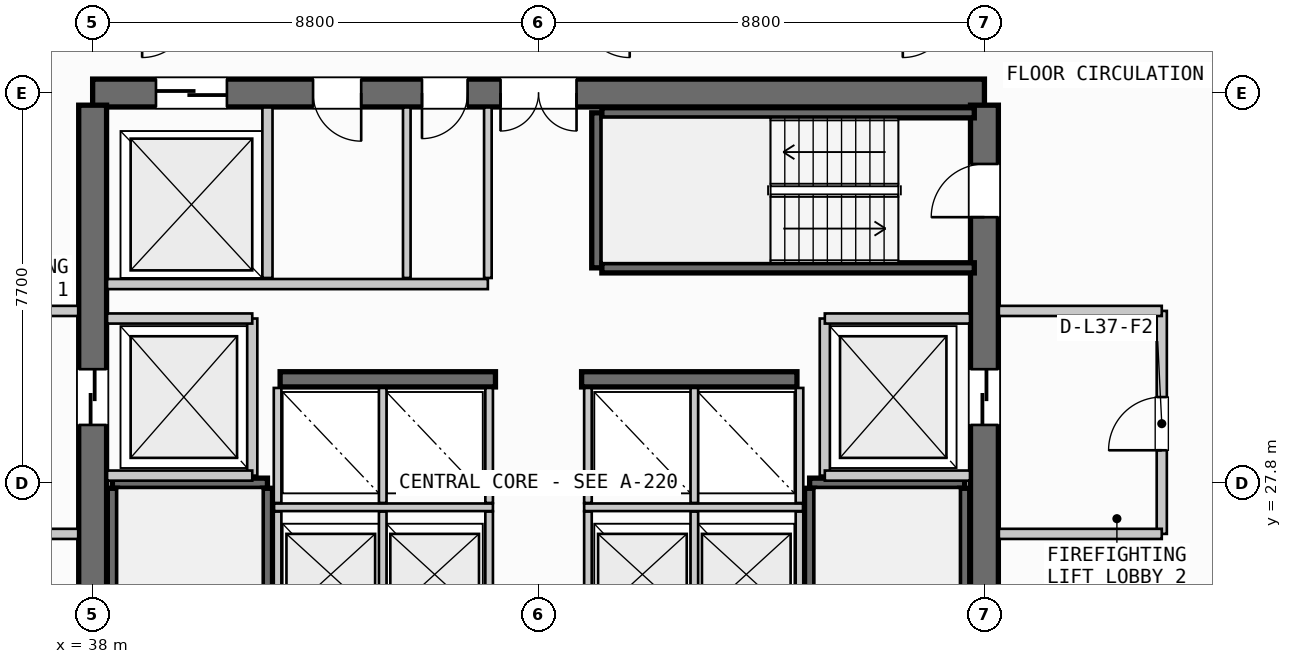
"""IFC4 building model, lengths in metres.
Left out: names, types, materials, properties, quantities, classifications, styles, units other than length and angle.
Written with IfcOpenShell. Run it as: python <this file> out.ifc"""

import sys

from ifc_helpers import new_model, si_unit, direction, frame, frame_2d, origin, place, context, subcontext, project, spatial, rectangle, extrude, source, transform, mapped, element, fill, save


model = new_model("IFC4")
c1 = context("Model", 3, precision=1e-05, world=origin(), true_north=direction((0.0, 1.0)))
c2 = subcontext(c1, "Body", "Model", "MODEL_VIEW")
j1 = project(units=[si_unit("LENGTHUNIT", "METRE"), si_unit("PLANEANGLEUNIT", "RADIAN")], contexts=[c1])
p1 = place(None, origin())
s1 = spatial("IfcSite", under=j1, at=p1, CompositionType="ELEMENT")
p2 = place(p1, origin())
s2 = spatial("IfcBuilding", under=s1, at=p2, CompositionType="ELEMENT")
p3 = place(p2, frame((0.0, 0.0, 146.55)))
s3 = spatial("IfcBuildingStorey", under=s2, at=p3, CompositionType="ELEMENT", Elevation=146.55)
p4 = place(p3, frame((55.6, 35.5, 0.0), z_axis=(0.0, 0.0, 1.0), x_axis=(-1.0, 0.0, 0.0)))
e1 = element("IfcWall", 1, at=p4, inside=s3, PredefinedType="SHEAR", context=c2, shape_type="SweptSolid", body=[
    extrude(rectangle(XDim=17.6, YDim=0.55, at=frame_2d((8.8, 0.0))), origin(), (0.0, 0.0, 1.0), 3.3),
])
p5 = place(p4, frame((8.05, 0.0, 0.0)))
e2 = element("IfcOpeningElement", 2, at=p5, cuts=e1, PredefinedType="OPENING", context=c2, shape_type="SweptSolid", body=[
    extrude(rectangle(XDim=1.5, YDim=2.2, at=frame_2d((0.75, 1.1))), frame((0.0, 0.285, 0.0), z_axis=(0.0, -1.0, 0.0), x_axis=(1.0, 0.0, 0.0)), (0.0, 0.0, 1.0), 0.57),
])
p6 = place(p4, frame((14.95, 0.0, 0.0)))
e3 = element("IfcOpeningElement", 3, at=p6, cuts=e1, PredefinedType="OPENING", context=c2, shape_type="SweptSolid", body=[
    extrude(rectangle(XDim=1.4, YDim=2.3, at=frame_2d((0.7, 1.15))), frame((0.0, 0.285, 0.0), z_axis=(0.0, -1.0, 0.0), x_axis=(1.0, 0.0, 0.0)), (0.0, 0.0, 1.0), 0.57),
])
p7 = place(p4, frame((12.3, 0.0, 0.0)))
e4 = element("IfcOpeningElement", 4, at=p7, cuts=e1, PredefinedType="OPENING", context=c2, shape_type="SweptSolid", body=[
    extrude(rectangle(XDim=0.95, YDim=2.15, at=frame_2d((0.475, 1.075))), frame((0.0, 0.285, 0.0), z_axis=(0.0, -1.0, 0.0), x_axis=(1.0, 0.0, 0.0)), (0.0, 0.0, 1.0), 0.57),
])
p8 = place(p4, frame((10.2, 0.0, 0.0)))
e5 = element("IfcOpeningElement", 5, at=p8, cuts=e1, PredefinedType="OPENING", context=c2, shape_type="SweptSolid", body=[
    extrude(rectangle(XDim=0.9, YDim=2.15, at=frame_2d((0.45, 1.075))), frame((0.0, 0.285, 0.0), z_axis=(0.0, -1.0, 0.0), x_axis=(1.0, 0.0, 0.0)), (0.0, 0.0, 1.0), 0.57),
])
p9 = place(p3, frame((38.0, 35.26, 0.0), z_axis=(0.0, 0.0, 1.0), x_axis=(0.0, -1.0, 0.0)))
e6 = element("IfcWall", 6, at=p9, inside=s3, PredefinedType="SHEAR", context=c2, shape_type="SweptSolid", body=[
    extrude(rectangle(XDim=14.92, YDim=0.55, at=frame_2d((7.46, 0.0))), origin(), (0.0, 0.0, 1.0), 3.3),
])
p10 = place(p9, frame((5.21, 0.0, 0.0)))
e7 = element("IfcOpeningElement", 7, at=p10, cuts=e6, PredefinedType="OPENING", context=c2, shape_type="SweptSolid", body=[
    extrude(rectangle(XDim=1.1, YDim=2.2, at=frame_2d((0.55, 1.1))), frame((0.0, 0.285, 0.0), z_axis=(0.0, -1.0, 0.0), x_axis=(1.0, 0.0, 0.0)), (0.0, 0.0, 1.0), 0.57),
])
p11 = place(p3, frame((55.6, 20.34, 0.0), z_axis=(0.0, 0.0, 1.0), x_axis=(0.0, 1.0, 0.0)))
e8 = element("IfcWall", 8, at=p11, inside=s3, PredefinedType="SHEAR", context=c2, shape_type="SweptSolid", body=[
    extrude(rectangle(XDim=14.92, YDim=0.55, at=frame_2d((7.46, 0.0))), origin(), (0.0, 0.0, 1.0), 3.3),
])
p12 = place(p11, frame((12.71, 0.0, 0.0)))
e9 = element("IfcOpeningElement", 9, at=p12, cuts=e8, PredefinedType="OPENING", context=c2, shape_type="SweptSolid", body=[
    extrude(rectangle(XDim=1.05, YDim=2.15, at=frame_2d((0.525, 1.075))), frame((0.0, 0.285, 0.0), z_axis=(0.0, -1.0, 0.0), x_axis=(1.0, 0.0, 0.0)), (0.0, 0.0, 1.0), 0.57),
])
p13 = place(p11, frame((8.61, 0.0, 0.0)))
e10 = element("IfcOpeningElement", 10, at=p13, cuts=e8, PredefinedType="OPENING", context=c2, shape_type="SweptSolid", body=[
    extrude(rectangle(XDim=1.1, YDim=2.2, at=frame_2d((0.55, 1.1))), frame((0.0, 0.285, 0.0), z_axis=(0.0, -1.0, 0.0), x_axis=(1.0, 0.0, 0.0)), (0.0, 0.0, 1.0), 0.57),
])
for number, where, z_axis, x_axis in (
    (11, (41.7, 29.85, 0.0), (0.0, 0.0, 1.0), (1.0, 0.0, 0.0)),
    (12, (47.65, 29.85, 0.0), (0.0, 0.0, 1.0), (1.0, 0.0, 0.0)),
):
    element("IfcWall", number, at=place(p3, frame(where, z_axis=z_axis, x_axis=x_axis)), inside=s3, PredefinedType="SHEAR", context=c2, shape_type="SweptSolid", body=[
        extrude(rectangle(XDim=4.25, YDim=0.3, at=frame_2d((2.125, 0.0))), origin(), (0.0, 0.0, 1.0), 3.3),
    ])
p14 = place(p3, frame((38.39, 27.8, 0.0), z_axis=(0.0, 0.0, 1.0), x_axis=(1.0, 0.0, 0.0)))
e13 = element("IfcWall", 13, at=p14, inside=s3, PredefinedType="SHEAR", context=c2, shape_type="SweptSolid", body=[
    extrude(rectangle(XDim=3.06, YDim=0.2, at=frame_2d((1.53, 0.0))), origin(), (0.0, 0.0, 1.0), 3.3),
])
for number, where, z_axis, x_axis in (
    (14, (41.45, 27.7, 0.0), (0.0, 0.0, 1.0), (0.0, -1.0, 0.0)),
    (15, (38.39, 20.35, 0.0), (0.0, 0.0, 1.0), (0.0, 1.0, 0.0)),
):
    element("IfcWall", number, at=place(p3, frame(where, z_axis=z_axis, x_axis=x_axis)), inside=s3, PredefinedType="SHEAR", context=c2, shape_type="SweptSolid", body=[
        extrude(rectangle(XDim=7.35, YDim=0.2, at=frame_2d((3.675, 0.0))), origin(), (0.0, 0.0, 1.0), 3.3),
    ])
p15 = place(p3, frame((52.15, 27.8, 0.0), z_axis=(0.0, 0.0, 1.0), x_axis=(1.0, 0.0, 0.0)))
e16 = element("IfcWall", 16, at=p15, inside=s3, PredefinedType="SHEAR", context=c2, shape_type="SweptSolid", body=[
    extrude(rectangle(XDim=3.06, YDim=0.2, at=frame_2d((1.53, 0.0))), origin(), (0.0, 0.0, 1.0), 3.3),
])
for number, where, z_axis, x_axis in (
    (17, (55.21, 27.7, 0.0), (0.0, 0.0, 1.0), (0.0, -1.0, 0.0)),
    (18, (52.15, 20.35, 0.0), (0.0, 0.0, 1.0), (0.0, 1.0, 0.0)),
):
    element("IfcWall", number, at=place(p3, frame(where, z_axis=z_axis, x_axis=x_axis)), inside=s3, PredefinedType="SHEAR", context=c2, shape_type="SweptSolid", body=[
        extrude(rectangle(XDim=7.35, YDim=0.2, at=frame_2d((3.675, 0.0))), origin(), (0.0, 0.0, 1.0), 3.3),
    ])
p16 = place(p3, frame((47.95, 32.05, 0.0), z_axis=(0.0, 0.0, 1.0), x_axis=(0.0, 1.0, 0.0)))
e19 = element("IfcWall", 19, at=p16, inside=s3, PredefinedType="SHEAR", context=c2, shape_type="SweptSolid", body=[
    extrude(rectangle(XDim=3.06, YDim=0.2, at=frame_2d((1.53, 0.0))), origin(), (0.0, 0.0, 1.0), 3.3),
])
for number, where, z_axis, x_axis in (
    (20, (48.05, 35.11, 0.0), (0.0, 0.0, 1.0), (1.0, 0.0, 0.0)),
    (21, (55.4, 32.05, 0.0), (0.0, 0.0, 1.0), (-1.0, 0.0, 0.0)),
):
    element("IfcWall", number, at=place(p3, frame(where, z_axis=z_axis, x_axis=x_axis)), inside=s3, PredefinedType="SHEAR", context=c2, shape_type="SweptSolid", body=[
        extrude(rectangle(XDim=7.35, YDim=0.2, at=frame_2d((3.675, 0.0))), origin(), (0.0, 0.0, 1.0), 3.3),
    ])
p17 = place(p3, frame((41.15, 27.95, 0.0), z_axis=(0.0, 0.0, 1.0), x_axis=(0.0, 1.0, 0.0)))
e22 = element("IfcWall", 22, at=p17, inside=s3, PredefinedType="PARTITIONING", context=c2, shape_type="SweptSolid", body=[
    extrude(rectangle(XDim=3.1, YDim=0.2, at=frame_2d((1.55, 0.0))), origin(), (0.0, 0.0, 1.0), 2.305),
])
for number, where, z_axis, x_axis in (
    (23, (38.285, 27.95, 0.0), (0.0, 0.0, 1.0), (1.0, 0.0, 0.0)),
    (24, (38.285, 31.05, 0.0), (0.0, 0.0, 1.0), (1.0, 0.0, 0.0)),
):
    element("IfcWall", number, at=place(p3, frame(where, z_axis=z_axis, x_axis=x_axis)), inside=s3, PredefinedType="PARTITIONING", context=c2, shape_type="SweptSolid", body=[
        extrude(rectangle(XDim=2.865, YDim=0.2, at=frame_2d((1.433, 0.0))), origin(), (0.0, 0.0, 1.0), 2.305),
    ])
for number, where, z_axis, x_axis in (
    (25, (34.5, 26.8, 0.0), (0.0, 0.0, 1.0), (1.0, 0.0, 0.0)),
    (26, (34.5, 31.2, 0.0), (0.0, 0.0, 1.0), (1.0, 0.0, 0.0)),
):
    element("IfcWall", number, at=place(p3, frame(where, z_axis=z_axis, x_axis=x_axis)), inside=s3, PredefinedType="PARTITIONING", context=c2, shape_type="SweptSolid", body=[
        extrude(rectangle(XDim=3.215, YDim=0.2, at=frame_2d((1.607, 0.0))), origin(), (0.0, 0.0, 1.0), 2.305),
    ])
p18 = place(p3, frame((52.45, 27.95, 0.0), z_axis=(0.0, 0.0, 1.0), x_axis=(0.0, 1.0, 0.0)))
e27 = element("IfcWall", 27, at=p18, inside=s3, PredefinedType="PARTITIONING", context=c2, shape_type="SweptSolid", body=[
    extrude(rectangle(XDim=3.1, YDim=0.2, at=frame_2d((1.55, 0.0))), origin(), (0.0, 0.0, 1.0), 2.305),
])
for number, where, z_axis, x_axis in (
    (28, (52.45, 27.95, 0.0), (0.0, 0.0, 1.0), (1.0, 0.0, 0.0)),
    (29, (52.45, 31.05, 0.0), (0.0, 0.0, 1.0), (1.0, 0.0, 0.0)),
):
    element("IfcWall", number, at=place(p3, frame(where, z_axis=z_axis, x_axis=x_axis)), inside=s3, PredefinedType="PARTITIONING", context=c2, shape_type="SweptSolid", body=[
        extrude(rectangle(XDim=2.865, YDim=0.2, at=frame_2d((1.433, 0.0))), origin(), (0.0, 0.0, 1.0), 2.305),
    ])
p19 = place(p3, frame((59.1, 26.8, 0.0), z_axis=(0.0, 0.0, 1.0), x_axis=(0.0, 1.0, 0.0)))
e30 = element("IfcWall", 30, at=p19, inside=s3, PredefinedType="PARTITIONING", context=c2, shape_type="SweptSolid", body=[
    extrude(rectangle(XDim=4.4, YDim=0.2, at=frame_2d((2.2, 0.0))), origin(), (0.0, 0.0, 1.0), 2.305),
])
p20 = place(p19, frame((1.65, 0.0, 0.0)))
e31 = element("IfcOpeningElement", 31, at=p20, cuts=e30, PredefinedType="OPENING", context=c2, shape_type="SweptSolid", body=[
    extrude(rectangle(XDim=1.05, YDim=2.15, at=frame_2d((0.525, 1.075))), frame((0.0, 0.11, 0.0), z_axis=(0.0, -1.0, 0.0), x_axis=(1.0, 0.0, 0.0)), (0.0, 0.0, 1.0), 0.22),
])
for number, where, z_axis, x_axis in (
    (32, (55.885, 26.8, 0.0), (0.0, 0.0, 1.0), (1.0, 0.0, 0.0)),
    (33, (55.885, 31.2, 0.0), (0.0, 0.0, 1.0), (1.0, 0.0, 0.0)),
):
    element("IfcWall", number, at=place(p3, frame(where, z_axis=z_axis, x_axis=x_axis)), inside=s3, PredefinedType="PARTITIONING", context=c2, shape_type="SweptSolid", body=[
        extrude(rectangle(XDim=3.215, YDim=0.2, at=frame_2d((1.607, 0.0))), origin(), (0.0, 0.0, 1.0), 2.305),
    ])
p21 = place(p3, frame((41.58, 27.325, 0.0), z_axis=(0.0, 0.0, 1.0), x_axis=(1.0, 0.0, 0.0)))
e34 = element("IfcWall", 34, at=p21, inside=s3, PredefinedType="PARTITIONING", context=c2, shape_type="SweptSolid", body=[
    extrude(rectangle(XDim=4.32, YDim=0.15, at=frame_2d((2.16, 0.0))), origin(), (0.0, 0.0, 1.0), 2.305),
])
p22 = place(p3, frame((47.7, 27.325, 0.0), z_axis=(0.0, 0.0, 1.0), x_axis=(1.0, 0.0, 0.0)))
e35 = element("IfcWall", 35, at=p22, inside=s3, PredefinedType="PARTITIONING", context=c2, shape_type="SweptSolid", body=[
    extrude(rectangle(XDim=4.32, YDim=0.15, at=frame_2d((2.16, 0.0))), origin(), (0.0, 0.0, 1.0), 2.305),
])
for number, where, z_axis, x_axis in (
    (36, (41.65, 24.92, 0.0), (0.0, 0.0, 1.0), (0.0, 1.0, 0.0)),
    (37, (43.725, 24.92, 0.0), (0.0, 0.0, 1.0), (0.0, 1.0, 0.0)),
    (38, (45.825, 24.92, 0.0), (0.0, 0.0, 1.0), (0.0, 1.0, 0.0)),
    (39, (47.775, 24.92, 0.0), (0.0, 0.0, 1.0), (0.0, 1.0, 0.0)),
    (40, (49.875, 24.92, 0.0), (0.0, 0.0, 1.0), (0.0, 1.0, 0.0)),
    (41, (51.95, 24.92, 0.0), (0.0, 0.0, 1.0), (0.0, 1.0, 0.0)),
):
    element("IfcWall", number, at=place(p3, frame(where, z_axis=z_axis, x_axis=x_axis)), inside=s3, PredefinedType="PARTITIONING", context=c2, shape_type="SweptSolid", body=[
        extrude(rectangle(XDim=2.32, YDim=0.15, at=frame_2d((1.16, 0.0))), origin(), (0.0, 0.0, 1.0), 2.305),
    ])
for number, where, z_axis, x_axis in (
    (42, (41.65, 27.41, 0.0), (0.0, 0.0, 1.0), (0.0, 1.0, 0.0)),
    (43, (43.725, 27.41, 0.0), (0.0, 0.0, 1.0), (0.0, 1.0, 0.0)),
    (44, (45.825, 27.41, 0.0), (0.0, 0.0, 1.0), (0.0, 1.0, 0.0)),
    (45, (47.775, 27.41, 0.0), (0.0, 0.0, 1.0), (0.0, 1.0, 0.0)),
    (46, (49.875, 27.41, 0.0), (0.0, 0.0, 1.0), (0.0, 1.0, 0.0)),
    (47, (51.95, 27.41, 0.0), (0.0, 0.0, 1.0), (0.0, 1.0, 0.0)),
):
    element("IfcWall", number, at=place(p3, frame(where, z_axis=z_axis, x_axis=x_axis)), inside=s3, PredefinedType="PARTITIONING", context=c2, shape_type="SweptSolid", body=[
        extrude(rectangle(XDim=2.27, YDim=0.15, at=frame_2d((1.135, 0.0))), origin(), (0.0, 0.0, 1.0), 2.305),
    ])
p23 = place(p3, frame((41.45, 31.85, 0.0), z_axis=(0.0, 0.0, 1.0), x_axis=(0.0, 1.0, 0.0)))
e48 = element("IfcWall", 48, at=p23, inside=s3, PredefinedType="PARTITIONING", context=c2, shape_type="SweptSolid", body=[
    extrude(rectangle(XDim=3.365, YDim=0.2, at=frame_2d((1.683, 0.0))), origin(), (0.0, 0.0, 1.0), 2.305),
])
p24 = place(p3, frame((38.285, 31.73, 0.0), z_axis=(0.0, 0.0, 1.0), x_axis=(1.0, 0.0, 0.0)))
e49 = element("IfcWall", 49, at=p24, inside=s3, PredefinedType="PARTITIONING", context=c2, shape_type="SweptSolid", body=[
    extrude(rectangle(XDim=7.515, YDim=0.2, at=frame_2d((3.758, 0.0))), origin(), (0.0, 0.0, 1.0), 2.305),
])
p25 = place(p3, frame((45.8, 31.85, 0.0), z_axis=(0.0, 0.0, 1.0), x_axis=(0.0, 1.0, 0.0)))
e50 = element("IfcWall", 50, at=p25, inside=s3, PredefinedType="PARTITIONING", context=c2, shape_type="SweptSolid", body=[
    extrude(rectangle(XDim=3.365, YDim=0.15, at=frame_2d((1.683, 0.0))), origin(), (0.0, 0.0, 1.0), 2.305),
])
p26 = place(p3, frame((44.2, 31.85, 0.0), z_axis=(0.0, 0.0, 1.0), x_axis=(0.0, 1.0, 0.0)))
e51 = element("IfcWall", 51, at=p26, inside=s3, PredefinedType="PLUMBINGWALL", context=c2, shape_type="SweptSolid", body=[
    extrude(rectangle(XDim=3.365, YDim=0.15, at=frame_2d((1.683, 0.0))), origin(), (0.0, 0.0, 1.0), 2.305),
])
m1 = source(origin(), c2, "Body", "SweptSolid", [
    extrude(rectangle(XDim=1.05, YDim=2.15, at=frame_2d((0.525, 1.075))), frame((0.0, 0.025, 0.0), z_axis=(0.0, -1.0, 0.0), x_axis=(1.0, 0.0, 0.0)), (0.0, 0.0, 1.0), 0.05),
])
p27 = place(p12, origin())
e52 = element("IfcDoor", 52, at=p27, inside=s3, OperationType="SINGLE_SWING_LEFT", PredefinedType="DOOR", context=c2, shape_type="MappedRepresentation", body=[
    mapped(m1, transform((0.0, 0.0, 0.0), scale=1.0)),
])
fill(e9, e52)
m2 = source(origin(), c2, "Body", "SweptSolid", [
    extrude(rectangle(XDim=1.5, YDim=2.2, at=frame_2d((0.75, 1.1))), frame((0.0, 0.025, 0.0), z_axis=(0.0, -1.0, 0.0), x_axis=(1.0, 0.0, 0.0)), (0.0, 0.0, 1.0), 0.05),
])
p28 = place(p5, origin())
e53 = element("IfcDoor", 53, at=p28, inside=s3, OperationType="DOUBLE_DOOR_SINGLE_SWING", PredefinedType="DOOR", context=c2, shape_type="MappedRepresentation", body=[
    mapped(m2, transform((0.0, 0.0, 0.0), scale=1.0)),
])
fill(e2, e53)
m3 = source(origin(), c2, "Body", "SweptSolid", [
    extrude(rectangle(XDim=1.1, YDim=2.2, at=frame_2d((0.55, 1.1))), frame((0.0, 0.025, 0.0), z_axis=(0.0, -1.0, 0.0), x_axis=(1.0, 0.0, 0.0)), (0.0, 0.0, 1.0), 0.05),
])
p29 = place(p10, origin())
e54 = element("IfcDoor", 54, at=p29, inside=s3, OperationType="SLIDING_TO_LEFT", PredefinedType="DOOR", context=c2, shape_type="MappedRepresentation", body=[
    mapped(m3, transform((0.0, 0.0, 0.0), scale=1.0)),
])
fill(e7, e54)
p30 = place(p13, origin())
e55 = element("IfcDoor", 55, at=p30, inside=s3, OperationType="SLIDING_TO_RIGHT", PredefinedType="DOOR", context=c2, shape_type="MappedRepresentation", body=[
    mapped(m3, transform((0.0, 0.0, 0.0), scale=1.0)),
])
fill(e10, e55)
m4 = source(origin(), c2, "Body", "SweptSolid", [
    extrude(rectangle(XDim=1.4, YDim=2.3, at=frame_2d((0.7, 1.15))), frame((0.0, 0.025, 0.0), z_axis=(0.0, -1.0, 0.0), x_axis=(1.0, 0.0, 0.0)), (0.0, 0.0, 1.0), 0.05),
])
p31 = place(p6, origin())
e56 = element("IfcDoor", 56, at=p31, inside=s3, OperationType="SLIDING_TO_RIGHT", PredefinedType="DOOR", context=c2, shape_type="MappedRepresentation", body=[
    mapped(m4, transform((0.0, 0.0, 0.0), scale=1.0)),
])
fill(e3, e56)
m5 = source(origin(), c2, "Body", "SweptSolid", [
    extrude(rectangle(XDim=0.95, YDim=2.15, at=frame_2d((0.475, 1.075))), frame((0.0, 0.025, 0.0), z_axis=(0.0, -1.0, 0.0), x_axis=(1.0, 0.0, 0.0)), (0.0, 0.0, 1.0), 0.05),
])
p32 = place(p7, origin())
e57 = element("IfcDoor", 57, at=p32, inside=s3, OperationType="SINGLE_SWING_LEFT", PredefinedType="DOOR", context=c2, shape_type="MappedRepresentation", body=[
    mapped(m5, transform((0.0, 0.0, 0.0), scale=1.0)),
])
fill(e4, e57)
m6 = source(origin(), c2, "Body", "SweptSolid", [
    extrude(rectangle(XDim=0.9, YDim=2.15, at=frame_2d((0.45, 1.075))), frame((0.0, 0.025, 0.0), z_axis=(0.0, -1.0, 0.0), x_axis=(1.0, 0.0, 0.0)), (0.0, 0.0, 1.0), 0.05),
])
p33 = place(p8, origin())
e58 = element("IfcDoor", 58, at=p33, inside=s3, OperationType="SINGLE_SWING_RIGHT", PredefinedType="DOOR", context=c2, shape_type="MappedRepresentation", body=[
    mapped(m6, transform((0.0, 0.0, 0.0), scale=1.0)),
])
fill(e5, e58)
p34 = place(p20, origin())
e59 = element("IfcDoor", 59, at=p34, inside=s3, OperationType="SINGLE_SWING_LEFT", PredefinedType="DOOR", context=c2, shape_type="MappedRepresentation", body=[
    mapped(m1, transform((0.0, 0.0, 0.0), scale=1.0)),
])
fill(e31, e59)
save(model, sys.argv[1])
